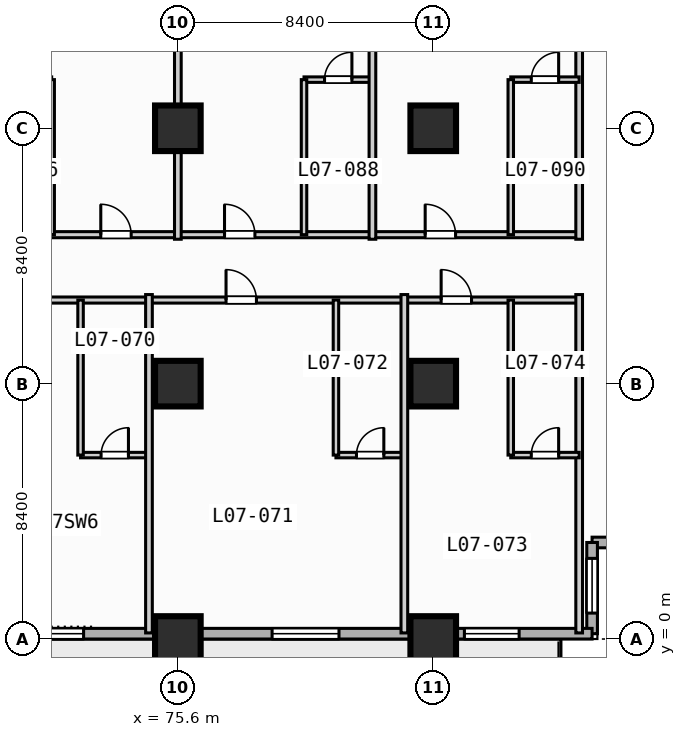
"""IFC4 building model, lengths in metres.
Left out: names, types, materials, properties, quantities, classifications, styles, units other than length and angle.
Written with IfcOpenShell. Run it as: python <this file> out.ifc"""

import sys

from ifc_helpers import new_model, si_unit, direction, frame, frame_2d, origin, origin_2d, place, context, subcontext, project, spatial, rectangle, extrude, element, fill, save


model = new_model("IFC4")
c1 = context("Model", 3, precision=1e-05, world=origin(), true_north=direction((0.0, 1.0)))
c2 = subcontext(c1, "Body", "Model", "MODEL_VIEW")
j1 = project(units=[si_unit("LENGTHUNIT", "METRE"), si_unit("PLANEANGLEUNIT", "RADIAN")], contexts=[c1])
p1 = place(None, origin())
s1 = spatial("IfcSite", under=j1, at=p1, CompositionType="ELEMENT")
p2 = place(p1, origin())
s2 = spatial("IfcBuilding", under=s1, at=p2, CompositionType="ELEMENT")
p3 = place(p2, frame((0.0, 0.0, 35.8)))
s3 = spatial("IfcBuildingStorey", under=s2, at=p3, CompositionType="ELEMENT", Elevation=35.8)
for number, where, z_axis, x_axis in (
    (1, (75.6, 0.0, 0.0), (0.0, 0.0, 1.0), (1.0, 0.0, 0.0)),
    (2, (75.6, 8.4, 0.0), (0.0, 0.0, 1.0), (1.0, 0.0, 0.0)),
    (3, (75.6, 16.8, 0.0), (0.0, 0.0, 1.0), (1.0, 0.0, 0.0)),
    (4, (84.0, 0.0, 0.0), (0.0, 0.0, 1.0), (1.0, 0.0, 0.0)),
    (5, (84.0, 8.4, 0.0), (0.0, 0.0, 1.0), (1.0, 0.0, 0.0)),
    (6, (84.0, 16.8, 0.0), (0.0, 0.0, 1.0), (1.0, 0.0, 0.0)),
):
    element("IfcColumn", number, at=place(p3, frame(where, z_axis=z_axis, x_axis=x_axis)), inside=s3, PredefinedType="COLUMN", context=c2, shape_type="SweptSolid", body=[
        extrude(rectangle(XDim=1.5, YDim=1.5, at=origin_2d()), origin(), (0.0, 0.0, 1.0), 3.8),
    ])
p4 = place(p3, frame((92.225, 3.175, 0.0), z_axis=(0.0, 0.0, 1.0), x_axis=(-1.0, 0.0, 0.0)))
e7 = element("IfcWall", 7, at=p4, inside=s3, PredefinedType="STANDARD", context=c2, shape_type="SweptSolid", body=[
    extrude(rectangle(XDim=3.0, YDim=0.35, at=frame_2d((1.5, 0.0))), origin(), (0.0, 0.0, 1.0), 3.55),
])
p5 = place(p3, frame((89.225, 3.175, 0.0), z_axis=(0.0, 0.0, 1.0), x_axis=(0.0, -1.0, 0.0)))
e8 = element("IfcWall", 8, at=p5, inside=s3, PredefinedType="STANDARD", context=c2, shape_type="SweptSolid", body=[
    extrude(rectangle(XDim=3.0, YDim=0.35, at=frame_2d((1.5, 0.0))), origin(), (0.0, 0.0, 1.0), 3.55),
])
p6 = place(p5, frame((0.522, 0.0, 0.85)))
e9 = element("IfcOpeningElement", 9, at=p6, cuts=e8, PredefinedType="OPENING", context=c2, shape_type="SweptSolid", body=[
    extrude(rectangle(XDim=1.8, YDim=1.8, at=frame_2d((0.9, 0.9))), frame((0.0, 0.185, 0.0), z_axis=(0.0, -1.0, 0.0), x_axis=(1.0, 0.0, 0.0)), (0.0, 0.0, 1.0), 0.37),
])
p7 = place(p3, frame((89.225, 0.175, 0.0), z_axis=(0.0, 0.0, 1.0), x_axis=(-1.0, 0.0, 0.0)))
e10 = element("IfcWall", 10, at=p7, inside=s3, PredefinedType="STANDARD", context=c2, shape_type="SweptSolid", body=[
    extrude(rectangle(XDim=86.05, YDim=0.35, at=frame_2d((43.025, 0.0))), origin(), (0.0, 0.0, 1.0), 3.55),
])
p8 = place(p7, frame((67.525, 0.0, 0.0)))
e11 = element("IfcOpeningElement", 11, at=p8, cuts=e10, PredefinedType="OPENING", context=c2, shape_type="SweptSolid", body=[
    extrude(rectangle(XDim=1.4, YDim=2.2, at=frame_2d((0.7, 1.1))), frame((0.0, 0.185, 0.0), z_axis=(0.0, -1.0, 0.0), x_axis=(1.0, 0.0, 0.0)), (0.0, 0.0, 1.0), 0.37),
])
p9 = place(p7, frame((58.725, 0.0, 0.85)))
e12 = element("IfcOpeningElement", 12, at=p9, cuts=e10, PredefinedType="OPENING", context=c2, shape_type="SweptSolid", body=[
    extrude(rectangle(XDim=2.2, YDim=1.8, at=frame_2d((1.1, 0.9))), frame((0.0, 0.185, 0.0), z_axis=(0.0, -1.0, 0.0), x_axis=(1.0, 0.0, 0.0)), (0.0, 0.0, 1.0), 0.37),
])
p10 = place(p7, frame((50.325, 0.0, 0.85)))
e13 = element("IfcOpeningElement", 13, at=p10, cuts=e10, PredefinedType="OPENING", context=c2, shape_type="SweptSolid", body=[
    extrude(rectangle(XDim=2.2, YDim=1.8, at=frame_2d((1.1, 0.9))), frame((0.0, 0.185, 0.0), z_axis=(0.0, -1.0, 0.0), x_axis=(1.0, 0.0, 0.0)), (0.0, 0.0, 1.0), 0.37),
])
p11 = place(p7, frame((41.925, 0.0, 0.85)))
e14 = element("IfcOpeningElement", 14, at=p11, cuts=e10, PredefinedType="OPENING", context=c2, shape_type="SweptSolid", body=[
    extrude(rectangle(XDim=2.2, YDim=1.8, at=frame_2d((1.1, 0.9))), frame((0.0, 0.185, 0.0), z_axis=(0.0, -1.0, 0.0), x_axis=(1.0, 0.0, 0.0)), (0.0, 0.0, 1.0), 0.37),
])
p12 = place(p7, frame((33.525, 0.0, 0.85)))
e15 = element("IfcOpeningElement", 15, at=p12, cuts=e10, PredefinedType="OPENING", context=c2, shape_type="SweptSolid", body=[
    extrude(rectangle(XDim=2.2, YDim=1.8, at=frame_2d((1.1, 0.9))), frame((0.0, 0.185, 0.0), z_axis=(0.0, -1.0, 0.0), x_axis=(1.0, 0.0, 0.0)), (0.0, 0.0, 1.0), 0.37),
])
p13 = place(p7, frame((16.725, 0.0, 0.85)))
e16 = element("IfcOpeningElement", 16, at=p13, cuts=e10, PredefinedType="OPENING", context=c2, shape_type="SweptSolid", body=[
    extrude(rectangle(XDim=2.2, YDim=1.8, at=frame_2d((1.1, 0.9))), frame((0.0, 0.185, 0.0), z_axis=(0.0, -1.0, 0.0), x_axis=(1.0, 0.0, 0.0)), (0.0, 0.0, 1.0), 0.37),
])
p14 = place(p7, frame((8.325, 0.0, 0.85)))
e17 = element("IfcOpeningElement", 17, at=p14, cuts=e10, PredefinedType="OPENING", context=c2, shape_type="SweptSolid", body=[
    extrude(rectangle(XDim=2.2, YDim=1.8, at=frame_2d((1.1, 0.9))), frame((0.0, 0.185, 0.0), z_axis=(0.0, -1.0, 0.0), x_axis=(1.0, 0.0, 0.0)), (0.0, 0.0, 1.0), 0.37),
])
p15 = place(p7, frame((2.4, 0.0, 0.85)))
e18 = element("IfcOpeningElement", 18, at=p15, cuts=e10, PredefinedType="OPENING", context=c2, shape_type="SweptSolid", body=[
    extrude(rectangle(XDim=1.8, YDim=1.8, at=frame_2d((0.9, 0.9))), frame((0.0, 0.185, 0.0), z_axis=(0.0, -1.0, 0.0), x_axis=(1.0, 0.0, 0.0)), (0.0, 0.0, 1.0), 0.37),
])
p16 = place(p3, frame((13.4, 11.15, 0.0), z_axis=(0.0, 0.0, 1.0), x_axis=(1.0, 0.0, 0.0)))
e19 = element("IfcWall", 19, at=p16, inside=s3, PredefinedType="PARTITIONING", context=c2, shape_type="SweptSolid", body=[
    extrude(rectangle(XDim=75.4, YDim=0.2, at=frame_2d((37.7, 0.0))), origin(), (0.0, 0.0, 1.0), 3.55),
])
p17 = place(p16, frame((6.065, 0.0, 0.0)))
e20 = element("IfcOpeningElement", 20, at=p17, cuts=e19, PredefinedType="OPENING", context=c2, shape_type="SweptSolid", body=[
    extrude(rectangle(XDim=1.0, YDim=2.15, at=frame_2d((0.5, 1.075))), frame((0.0, 0.11, 0.0), z_axis=(0.0, -1.0, 0.0), x_axis=(1.0, 0.0, 0.0)), (0.0, 0.0, 1.0), 0.22),
])
p18 = place(p16, frame((13.36, 0.0, 0.0)))
e21 = element("IfcOpeningElement", 21, at=p18, cuts=e19, PredefinedType="OPENING", context=c2, shape_type="SweptSolid", body=[
    extrude(rectangle(XDim=1.0, YDim=2.15, at=frame_2d((0.5, 1.075))), frame((0.0, 0.11, 0.0), z_axis=(0.0, -1.0, 0.0), x_axis=(1.0, 0.0, 0.0)), (0.0, 0.0, 1.0), 0.22),
])
p19 = place(p16, frame((21.785, 0.0, 0.0)))
e22 = element("IfcOpeningElement", 22, at=p19, cuts=e19, PredefinedType="OPENING", context=c2, shape_type="SweptSolid", body=[
    extrude(rectangle(XDim=1.0, YDim=2.15, at=frame_2d((0.5, 1.075))), frame((0.0, 0.11, 0.0), z_axis=(0.0, -1.0, 0.0), x_axis=(1.0, 0.0, 0.0)), (0.0, 0.0, 1.0), 0.22),
])
p20 = place(p16, frame((30.185, 0.0, 0.0)))
e23 = element("IfcOpeningElement", 23, at=p20, cuts=e19, PredefinedType="OPENING", context=c2, shape_type="SweptSolid", body=[
    extrude(rectangle(XDim=1.0, YDim=2.15, at=frame_2d((0.5, 1.075))), frame((0.0, 0.11, 0.0), z_axis=(0.0, -1.0, 0.0), x_axis=(1.0, 0.0, 0.0)), (0.0, 0.0, 1.0), 0.22),
])
p21 = place(p16, frame((41.76, 0.0, 0.0)))
e24 = element("IfcOpeningElement", 24, at=p21, cuts=e19, PredefinedType="OPENING", context=c2, shape_type="SweptSolid", body=[
    extrude(rectangle(XDim=1.0, YDim=2.15, at=frame_2d((0.5, 1.075))), frame((0.0, 0.11, 0.0), z_axis=(0.0, -1.0, 0.0), x_axis=(1.0, 0.0, 0.0)), (0.0, 0.0, 1.0), 0.22),
])
p22 = place(p16, frame((54.36, 0.0, 0.0)))
e25 = element("IfcOpeningElement", 25, at=p22, cuts=e19, PredefinedType="OPENING", context=c2, shape_type="SweptSolid", body=[
    extrude(rectangle(XDim=1.0, YDim=2.15, at=frame_2d((0.5, 1.075))), frame((0.0, 0.11, 0.0), z_axis=(0.0, -1.0, 0.0), x_axis=(1.0, 0.0, 0.0)), (0.0, 0.0, 1.0), 0.22),
])
p23 = place(p16, frame((63.785, 0.0, 0.0)))
e26 = element("IfcOpeningElement", 26, at=p23, cuts=e19, PredefinedType="OPENING", context=c2, shape_type="SweptSolid", body=[
    extrude(rectangle(XDim=1.0, YDim=2.15, at=frame_2d((0.5, 1.075))), frame((0.0, 0.11, 0.0), z_axis=(0.0, -1.0, 0.0), x_axis=(1.0, 0.0, 0.0)), (0.0, 0.0, 1.0), 0.22),
])
p24 = place(p16, frame((70.86, 0.0, 0.0)))
e27 = element("IfcOpeningElement", 27, at=p24, cuts=e19, PredefinedType="OPENING", context=c2, shape_type="SweptSolid", body=[
    extrude(rectangle(XDim=1.0, YDim=2.15, at=frame_2d((0.5, 1.075))), frame((0.0, 0.11, 0.0), z_axis=(0.0, -1.0, 0.0), x_axis=(1.0, 0.0, 0.0)), (0.0, 0.0, 1.0), 0.22),
])
p25 = place(p3, frame((72.4, 6.05, 0.0), z_axis=(0.0, 0.0, 1.0), x_axis=(1.0, 0.0, 0.0)))
e28 = element("IfcWall", 28, at=p25, inside=s3, PredefinedType="PLUMBINGWALL", context=c2, shape_type="SweptSolid", body=[
    extrude(rectangle(XDim=2.25, YDim=0.18, at=frame_2d((1.125, 0.0))), origin(), (0.0, 0.0, 1.0), 3.55),
])
p26 = place(p25, frame((0.675, 0.0, 0.0)))
e29 = element("IfcOpeningElement", 29, at=p26, cuts=e28, PredefinedType="OPENING", context=c2, shape_type="SweptSolid", body=[
    extrude(rectangle(XDim=0.9, YDim=2.1, at=frame_2d((0.45, 1.05))), frame((0.0, 0.1, 0.0), z_axis=(0.0, -1.0, 0.0), x_axis=(1.0, 0.0, 0.0)), (0.0, 0.0, 1.0), 0.2),
])
p27 = place(p3, frame((72.4, 6.05, 0.0), z_axis=(0.0, 0.0, 1.0), x_axis=(0.0, 1.0, 0.0)))
e30 = element("IfcWall", 30, at=p27, inside=s3, PredefinedType="PLUMBINGWALL", context=c2, shape_type="SweptSolid", body=[
    extrude(rectangle(XDim=5.1, YDim=0.18, at=frame_2d((2.55, 0.0))), origin(), (0.0, 0.0, 1.0), 3.55),
])
p28 = place(p3, frame((74.65, 0.2, 0.0), z_axis=(0.0, 0.0, 1.0), x_axis=(0.0, 1.0, 0.0)))
e31 = element("IfcWall", 31, at=p28, inside=s3, PredefinedType="PARTITIONING", context=c2, shape_type="SweptSolid", body=[
    extrude(rectangle(XDim=11.13, YDim=0.22, at=frame_2d((5.565, 0.0))), origin(), (0.0, 0.0, 1.0), 3.55),
])
p29 = place(p3, frame((80.8, 6.05, 0.0), z_axis=(0.0, 0.0, 1.0), x_axis=(1.0, 0.0, 0.0)))
e32 = element("IfcWall", 32, at=p29, inside=s3, PredefinedType="PLUMBINGWALL", context=c2, shape_type="SweptSolid", body=[
    extrude(rectangle(XDim=2.25, YDim=0.18, at=frame_2d((1.125, 0.0))), origin(), (0.0, 0.0, 1.0), 3.55),
])
p30 = place(p29, frame((0.675, 0.0, 0.0)))
e33 = element("IfcOpeningElement", 33, at=p30, cuts=e32, PredefinedType="OPENING", context=c2, shape_type="SweptSolid", body=[
    extrude(rectangle(XDim=0.9, YDim=2.1, at=frame_2d((0.45, 1.05))), frame((0.0, 0.1, 0.0), z_axis=(0.0, -1.0, 0.0), x_axis=(1.0, 0.0, 0.0)), (0.0, 0.0, 1.0), 0.2),
])
p31 = place(p3, frame((80.8, 6.05, 0.0), z_axis=(0.0, 0.0, 1.0), x_axis=(0.0, 1.0, 0.0)))
e34 = element("IfcWall", 34, at=p31, inside=s3, PredefinedType="PLUMBINGWALL", context=c2, shape_type="SweptSolid", body=[
    extrude(rectangle(XDim=5.1, YDim=0.18, at=frame_2d((2.55, 0.0))), origin(), (0.0, 0.0, 1.0), 3.55),
])
for number, where, z_axis, x_axis in (
    (35, (83.05, 0.2, 0.0), (0.0, 0.0, 1.0), (0.0, 1.0, 0.0)),
    (36, (88.8, 0.2, 0.0), (0.0, 0.0, 1.0), (0.0, 1.0, 0.0)),
):
    element("IfcWall", number, at=place(p3, frame(where, z_axis=z_axis, x_axis=x_axis)), inside=s3, PredefinedType="PARTITIONING", context=c2, shape_type="SweptSolid", body=[
        extrude(rectangle(XDim=11.13, YDim=0.22, at=frame_2d((5.565, 0.0))), origin(), (0.0, 0.0, 1.0), 3.55),
    ])
p32 = place(p3, frame((86.55, 6.05, 0.0), z_axis=(0.0, 0.0, 1.0), x_axis=(1.0, 0.0, 0.0)))
e37 = element("IfcWall", 37, at=p32, inside=s3, PredefinedType="PLUMBINGWALL", context=c2, shape_type="SweptSolid", body=[
    extrude(rectangle(XDim=2.25, YDim=0.18, at=frame_2d((1.125, 0.0))), origin(), (0.0, 0.0, 1.0), 3.55),
])
p33 = place(p32, frame((0.675, 0.0, 0.0)))
e38 = element("IfcOpeningElement", 38, at=p33, cuts=e37, PredefinedType="OPENING", context=c2, shape_type="SweptSolid", body=[
    extrude(rectangle(XDim=0.9, YDim=2.1, at=frame_2d((0.45, 1.05))), frame((0.0, 0.1, 0.0), z_axis=(0.0, -1.0, 0.0), x_axis=(1.0, 0.0, 0.0)), (0.0, 0.0, 1.0), 0.2),
])
p34 = place(p3, frame((86.55, 6.05, 0.0), z_axis=(0.0, 0.0, 1.0), x_axis=(0.0, 1.0, 0.0)))
e39 = element("IfcWall", 39, at=p34, inside=s3, PredefinedType="PLUMBINGWALL", context=c2, shape_type="SweptSolid", body=[
    extrude(rectangle(XDim=5.1, YDim=0.18, at=frame_2d((2.55, 0.0))), origin(), (0.0, 0.0, 1.0), 3.55),
])
p35 = place(p3, frame((61.6, 13.3, 0.0), z_axis=(0.0, 0.0, 1.0), x_axis=(1.0, 0.0, 0.0)))
e40 = element("IfcWall", 40, at=p35, inside=s3, PredefinedType="PARTITIONING", context=c2, shape_type="SweptSolid", body=[
    extrude(rectangle(XDim=27.2, YDim=0.2, at=frame_2d((13.6, 0.0))), origin(), (0.0, 0.0, 1.0), 3.55),
])
p36 = place(p35, frame((4.465, 0.0, 0.0)))
e41 = element("IfcOpeningElement", 41, at=p36, cuts=e40, PredefinedType="OPENING", context=c2, shape_type="SweptSolid", body=[
    extrude(rectangle(XDim=1.0, YDim=2.15, at=frame_2d((0.5, 1.075))), frame((0.0, 0.11, 0.0), z_axis=(0.0, -1.0, 0.0), x_axis=(1.0, 0.0, 0.0)), (0.0, 0.0, 1.0), 0.22),
])
p37 = place(p35, frame((11.465, 0.0, 0.0)))
e42 = element("IfcOpeningElement", 42, at=p37, cuts=e40, PredefinedType="OPENING", context=c2, shape_type="SweptSolid", body=[
    extrude(rectangle(XDim=1.0, YDim=2.15, at=frame_2d((0.5, 1.075))), frame((0.0, 0.11, 0.0), z_axis=(0.0, -1.0, 0.0), x_axis=(1.0, 0.0, 0.0)), (0.0, 0.0, 1.0), 0.22),
])
p38 = place(p35, frame((15.535, 0.0, 0.0)))
e43 = element("IfcOpeningElement", 43, at=p38, cuts=e40, PredefinedType="OPENING", context=c2, shape_type="SweptSolid", body=[
    extrude(rectangle(XDim=1.0, YDim=2.15, at=frame_2d((0.5, 1.075))), frame((0.0, 0.11, 0.0), z_axis=(0.0, -1.0, 0.0), x_axis=(1.0, 0.0, 0.0)), (0.0, 0.0, 1.0), 0.22),
])
p39 = place(p35, frame((22.135, 0.0, 0.0)))
e44 = element("IfcOpeningElement", 44, at=p39, cuts=e40, PredefinedType="OPENING", context=c2, shape_type="SweptSolid", body=[
    extrude(rectangle(XDim=1.0, YDim=2.15, at=frame_2d((0.5, 1.075))), frame((0.0, 0.11, 0.0), z_axis=(0.0, -1.0, 0.0), x_axis=(1.0, 0.0, 0.0)), (0.0, 0.0, 1.0), 0.22),
])
p40 = place(p3, frame((71.45, 13.3, 0.0), z_axis=(0.0, 0.0, 1.0), x_axis=(0.0, 1.0, 0.0)))
e45 = element("IfcWall", 45, at=p40, inside=s3, PredefinedType="PLUMBINGWALL", context=c2, shape_type="SweptSolid", body=[
    extrude(rectangle(XDim=5.1, YDim=0.18, at=frame_2d((2.55, 0.0))), origin(), (0.0, 0.0, 1.0), 3.55),
])
p41 = place(p3, frame((75.6, 13.15, 0.0), z_axis=(0.0, 0.0, 1.0), x_axis=(0.0, 1.0, 0.0)))
e46 = element("IfcWall", 46, at=p41, inside=s3, PredefinedType="PARTITIONING", context=c2, shape_type="SweptSolid", body=[
    extrude(rectangle(XDim=20.28, YDim=0.22, at=frame_2d((10.14, 0.0))), origin(), (0.0, 0.0, 1.0), 2.8),
])
p42 = place(p3, frame((79.75, 18.4, 0.0), z_axis=(0.0, 0.0, 1.0), x_axis=(1.0, 0.0, 0.0)))
e47 = element("IfcWall", 47, at=p42, inside=s3, PredefinedType="PLUMBINGWALL", context=c2, shape_type="SweptSolid", body=[
    extrude(rectangle(XDim=2.25, YDim=0.18, at=frame_2d((1.125, 0.0))), origin(), (0.0, 0.0, 1.0), 3.55),
])
p43 = place(p42, frame((0.675, 0.0, 0.0)))
e48 = element("IfcOpeningElement", 48, at=p43, cuts=e47, PredefinedType="OPENING", context=c2, shape_type="SweptSolid", body=[
    extrude(rectangle(XDim=0.9, YDim=2.1, at=frame_2d((0.45, 1.05))), frame((0.0, 0.1, 0.0), z_axis=(0.0, -1.0, 0.0), x_axis=(1.0, 0.0, 0.0)), (0.0, 0.0, 1.0), 0.2),
])
p44 = place(p3, frame((79.75, 13.3, 0.0), z_axis=(0.0, 0.0, 1.0), x_axis=(0.0, 1.0, 0.0)))
e49 = element("IfcWall", 49, at=p44, inside=s3, PredefinedType="PLUMBINGWALL", context=c2, shape_type="SweptSolid", body=[
    extrude(rectangle(XDim=5.1, YDim=0.18, at=frame_2d((2.55, 0.0))), origin(), (0.0, 0.0, 1.0), 3.55),
])
for number, where, z_axis, x_axis in (
    (50, (82.0, 13.15, 0.0), (0.0, 0.0, 1.0), (0.0, 1.0, 0.0)),
    (51, (88.8, 13.15, 0.0), (0.0, 0.0, 1.0), (0.0, 1.0, 0.0)),
):
    element("IfcWall", number, at=place(p3, frame(where, z_axis=z_axis, x_axis=x_axis)), inside=s3, PredefinedType="PARTITIONING", context=c2, shape_type="SweptSolid", body=[
        extrude(rectangle(XDim=20.28, YDim=0.22, at=frame_2d((10.14, 0.0))), origin(), (0.0, 0.0, 1.0), 3.55),
    ])
p45 = place(p3, frame((86.55, 18.4, 0.0), z_axis=(0.0, 0.0, 1.0), x_axis=(1.0, 0.0, 0.0)))
e52 = element("IfcWall", 52, at=p45, inside=s3, PredefinedType="PLUMBINGWALL", context=c2, shape_type="SweptSolid", body=[
    extrude(rectangle(XDim=2.25, YDim=0.18, at=frame_2d((1.125, 0.0))), origin(), (0.0, 0.0, 1.0), 3.55),
])
p46 = place(p45, frame((0.675, 0.0, 0.0)))
e53 = element("IfcOpeningElement", 53, at=p46, cuts=e52, PredefinedType="OPENING", context=c2, shape_type="SweptSolid", body=[
    extrude(rectangle(XDim=0.9, YDim=2.1, at=frame_2d((0.45, 1.05))), frame((0.0, 0.1, 0.0), z_axis=(0.0, -1.0, 0.0), x_axis=(1.0, 0.0, 0.0)), (0.0, 0.0, 1.0), 0.2),
])
p47 = place(p3, frame((86.55, 13.3, 0.0), z_axis=(0.0, 0.0, 1.0), x_axis=(0.0, 1.0, 0.0)))
e54 = element("IfcWall", 54, at=p47, inside=s3, PredefinedType="PLUMBINGWALL", context=c2, shape_type="SweptSolid", body=[
    extrude(rectangle(XDim=5.1, YDim=0.18, at=frame_2d((2.55, 0.0))), origin(), (0.0, 0.0, 1.0), 3.55),
])
p48 = place(p6, origin())
e55 = element("IfcWindow", 55, at=p48, inside=s3, PartitioningType="SINGLE_PANEL", PredefinedType="WINDOW", context=c2, shape_type="SweptSolid", body=[
    extrude(rectangle(XDim=1.8, YDim=1.8, at=frame_2d((0.9, 0.9))), frame((0.0, 0.03, 0.0), z_axis=(0.0, -1.0, 0.0), x_axis=(1.0, 0.0, 0.0)), (0.0, 0.0, 1.0), 0.06),
])
fill(e9, e55)
p49 = place(p13, origin())
e56 = element("IfcWindow", 56, at=p49, inside=s3, PartitioningType="SINGLE_PANEL", PredefinedType="WINDOW", context=c2, shape_type="SweptSolid", body=[
    extrude(rectangle(XDim=2.2, YDim=1.8, at=frame_2d((1.1, 0.9))), frame((0.0, 0.03, 0.0), z_axis=(0.0, -1.0, 0.0), x_axis=(1.0, 0.0, 0.0)), (0.0, 0.0, 1.0), 0.06),
])
fill(e16, e56)
p50 = place(p14, origin())
e57 = element("IfcWindow", 57, at=p50, inside=s3, PartitioningType="SINGLE_PANEL", PredefinedType="WINDOW", context=c2, shape_type="SweptSolid", body=[
    extrude(rectangle(XDim=2.2, YDim=1.8, at=frame_2d((1.1, 0.9))), frame((0.0, 0.03, 0.0), z_axis=(0.0, -1.0, 0.0), x_axis=(1.0, 0.0, 0.0)), (0.0, 0.0, 1.0), 0.06),
])
fill(e17, e57)
p51 = place(p15, origin())
e58 = element("IfcWindow", 58, at=p51, inside=s3, PartitioningType="SINGLE_PANEL", PredefinedType="WINDOW", context=c2, shape_type="SweptSolid", body=[
    extrude(rectangle(XDim=1.8, YDim=1.8, at=frame_2d((0.9, 0.9))), frame((0.0, 0.03, 0.0), z_axis=(0.0, -1.0, 0.0), x_axis=(1.0, 0.0, 0.0)), (0.0, 0.0, 1.0), 0.06),
])
fill(e18, e58)
p52 = place(p23, origin())
e59 = element("IfcDoor", 59, at=p52, inside=s3, OperationType="SINGLE_SWING_LEFT", PredefinedType="DOOR", context=c2, shape_type="SweptSolid", body=[
    extrude(rectangle(XDim=1.0, YDim=2.15, at=frame_2d((0.5, 1.075))), frame((0.0, 0.025, 0.0), z_axis=(0.0, -1.0, 0.0), x_axis=(1.0, 0.0, 0.0)), (0.0, 0.0, 1.0), 0.05),
])
fill(e26, e59)
p53 = place(p24, origin())
e60 = element("IfcDoor", 60, at=p53, inside=s3, OperationType="SINGLE_SWING_LEFT", PredefinedType="DOOR", context=c2, shape_type="SweptSolid", body=[
    extrude(rectangle(XDim=1.0, YDim=2.15, at=frame_2d((0.5, 1.075))), frame((0.0, 0.025, 0.0), z_axis=(0.0, -1.0, 0.0), x_axis=(1.0, 0.0, 0.0)), (0.0, 0.0, 1.0), 0.05),
])
fill(e27, e60)
p54 = place(p26, origin())
e61 = element("IfcDoor", 61, at=p54, inside=s3, OperationType="SINGLE_SWING_RIGHT", PredefinedType="DOOR", context=c2, shape_type="SweptSolid", body=[
    extrude(rectangle(XDim=0.9, YDim=2.1, at=frame_2d((0.45, 1.05))), frame((0.0, 0.025, 0.0), z_axis=(0.0, -1.0, 0.0), x_axis=(1.0, 0.0, 0.0)), (0.0, 0.0, 1.0), 0.05),
])
fill(e29, e61)
p55 = place(p30, origin())
e62 = element("IfcDoor", 62, at=p55, inside=s3, OperationType="SINGLE_SWING_RIGHT", PredefinedType="DOOR", context=c2, shape_type="SweptSolid", body=[
    extrude(rectangle(XDim=0.9, YDim=2.1, at=frame_2d((0.45, 1.05))), frame((0.0, 0.025, 0.0), z_axis=(0.0, -1.0, 0.0), x_axis=(1.0, 0.0, 0.0)), (0.0, 0.0, 1.0), 0.05),
])
fill(e33, e62)
p56 = place(p33, origin())
e63 = element("IfcDoor", 63, at=p56, inside=s3, OperationType="SINGLE_SWING_RIGHT", PredefinedType="DOOR", context=c2, shape_type="SweptSolid", body=[
    extrude(rectangle(XDim=0.9, YDim=2.1, at=frame_2d((0.45, 1.05))), frame((0.0, 0.025, 0.0), z_axis=(0.0, -1.0, 0.0), x_axis=(1.0, 0.0, 0.0)), (0.0, 0.0, 1.0), 0.05),
])
fill(e38, e63)
p57 = place(p37, origin())
e64 = element("IfcDoor", 64, at=p57, inside=s3, OperationType="SINGLE_SWING_LEFT", PredefinedType="DOOR", context=c2, shape_type="SweptSolid", body=[
    extrude(rectangle(XDim=1.0, YDim=2.15, at=frame_2d((0.5, 1.075))), frame((0.0, 0.025, 0.0), z_axis=(0.0, -1.0, 0.0), x_axis=(1.0, 0.0, 0.0)), (0.0, 0.0, 1.0), 0.05),
])
fill(e42, e64)
p58 = place(p38, origin())
e65 = element("IfcDoor", 65, at=p58, inside=s3, OperationType="SINGLE_SWING_LEFT", PredefinedType="DOOR", context=c2, shape_type="SweptSolid", body=[
    extrude(rectangle(XDim=1.0, YDim=2.15, at=frame_2d((0.5, 1.075))), frame((0.0, 0.025, 0.0), z_axis=(0.0, -1.0, 0.0), x_axis=(1.0, 0.0, 0.0)), (0.0, 0.0, 1.0), 0.05),
])
fill(e43, e65)
p59 = place(p39, origin())
e66 = element("IfcDoor", 66, at=p59, inside=s3, OperationType="SINGLE_SWING_LEFT", PredefinedType="DOOR", context=c2, shape_type="SweptSolid", body=[
    extrude(rectangle(XDim=1.0, YDim=2.15, at=frame_2d((0.5, 1.075))), frame((0.0, 0.025, 0.0), z_axis=(0.0, -1.0, 0.0), x_axis=(1.0, 0.0, 0.0)), (0.0, 0.0, 1.0), 0.05),
])
fill(e44, e66)
p60 = place(p43, origin())
e67 = element("IfcDoor", 67, at=p60, inside=s3, OperationType="SINGLE_SWING_RIGHT", PredefinedType="DOOR", context=c2, shape_type="SweptSolid", body=[
    extrude(rectangle(XDim=0.9, YDim=2.1, at=frame_2d((0.45, 1.05))), frame((0.0, 0.025, 0.0), z_axis=(0.0, -1.0, 0.0), x_axis=(1.0, 0.0, 0.0)), (0.0, 0.0, 1.0), 0.05),
])
fill(e48, e67)
p61 = place(p46, origin())
e68 = element("IfcDoor", 68, at=p61, inside=s3, OperationType="SINGLE_SWING_RIGHT", PredefinedType="DOOR", context=c2, shape_type="SweptSolid", body=[
    extrude(rectangle(XDim=0.9, YDim=2.1, at=frame_2d((0.45, 1.05))), frame((0.0, 0.025, 0.0), z_axis=(0.0, -1.0, 0.0), x_axis=(1.0, 0.0, 0.0)), (0.0, 0.0, 1.0), 0.05),
])
fill(e53, e68)
save(model, sys.argv[1])
